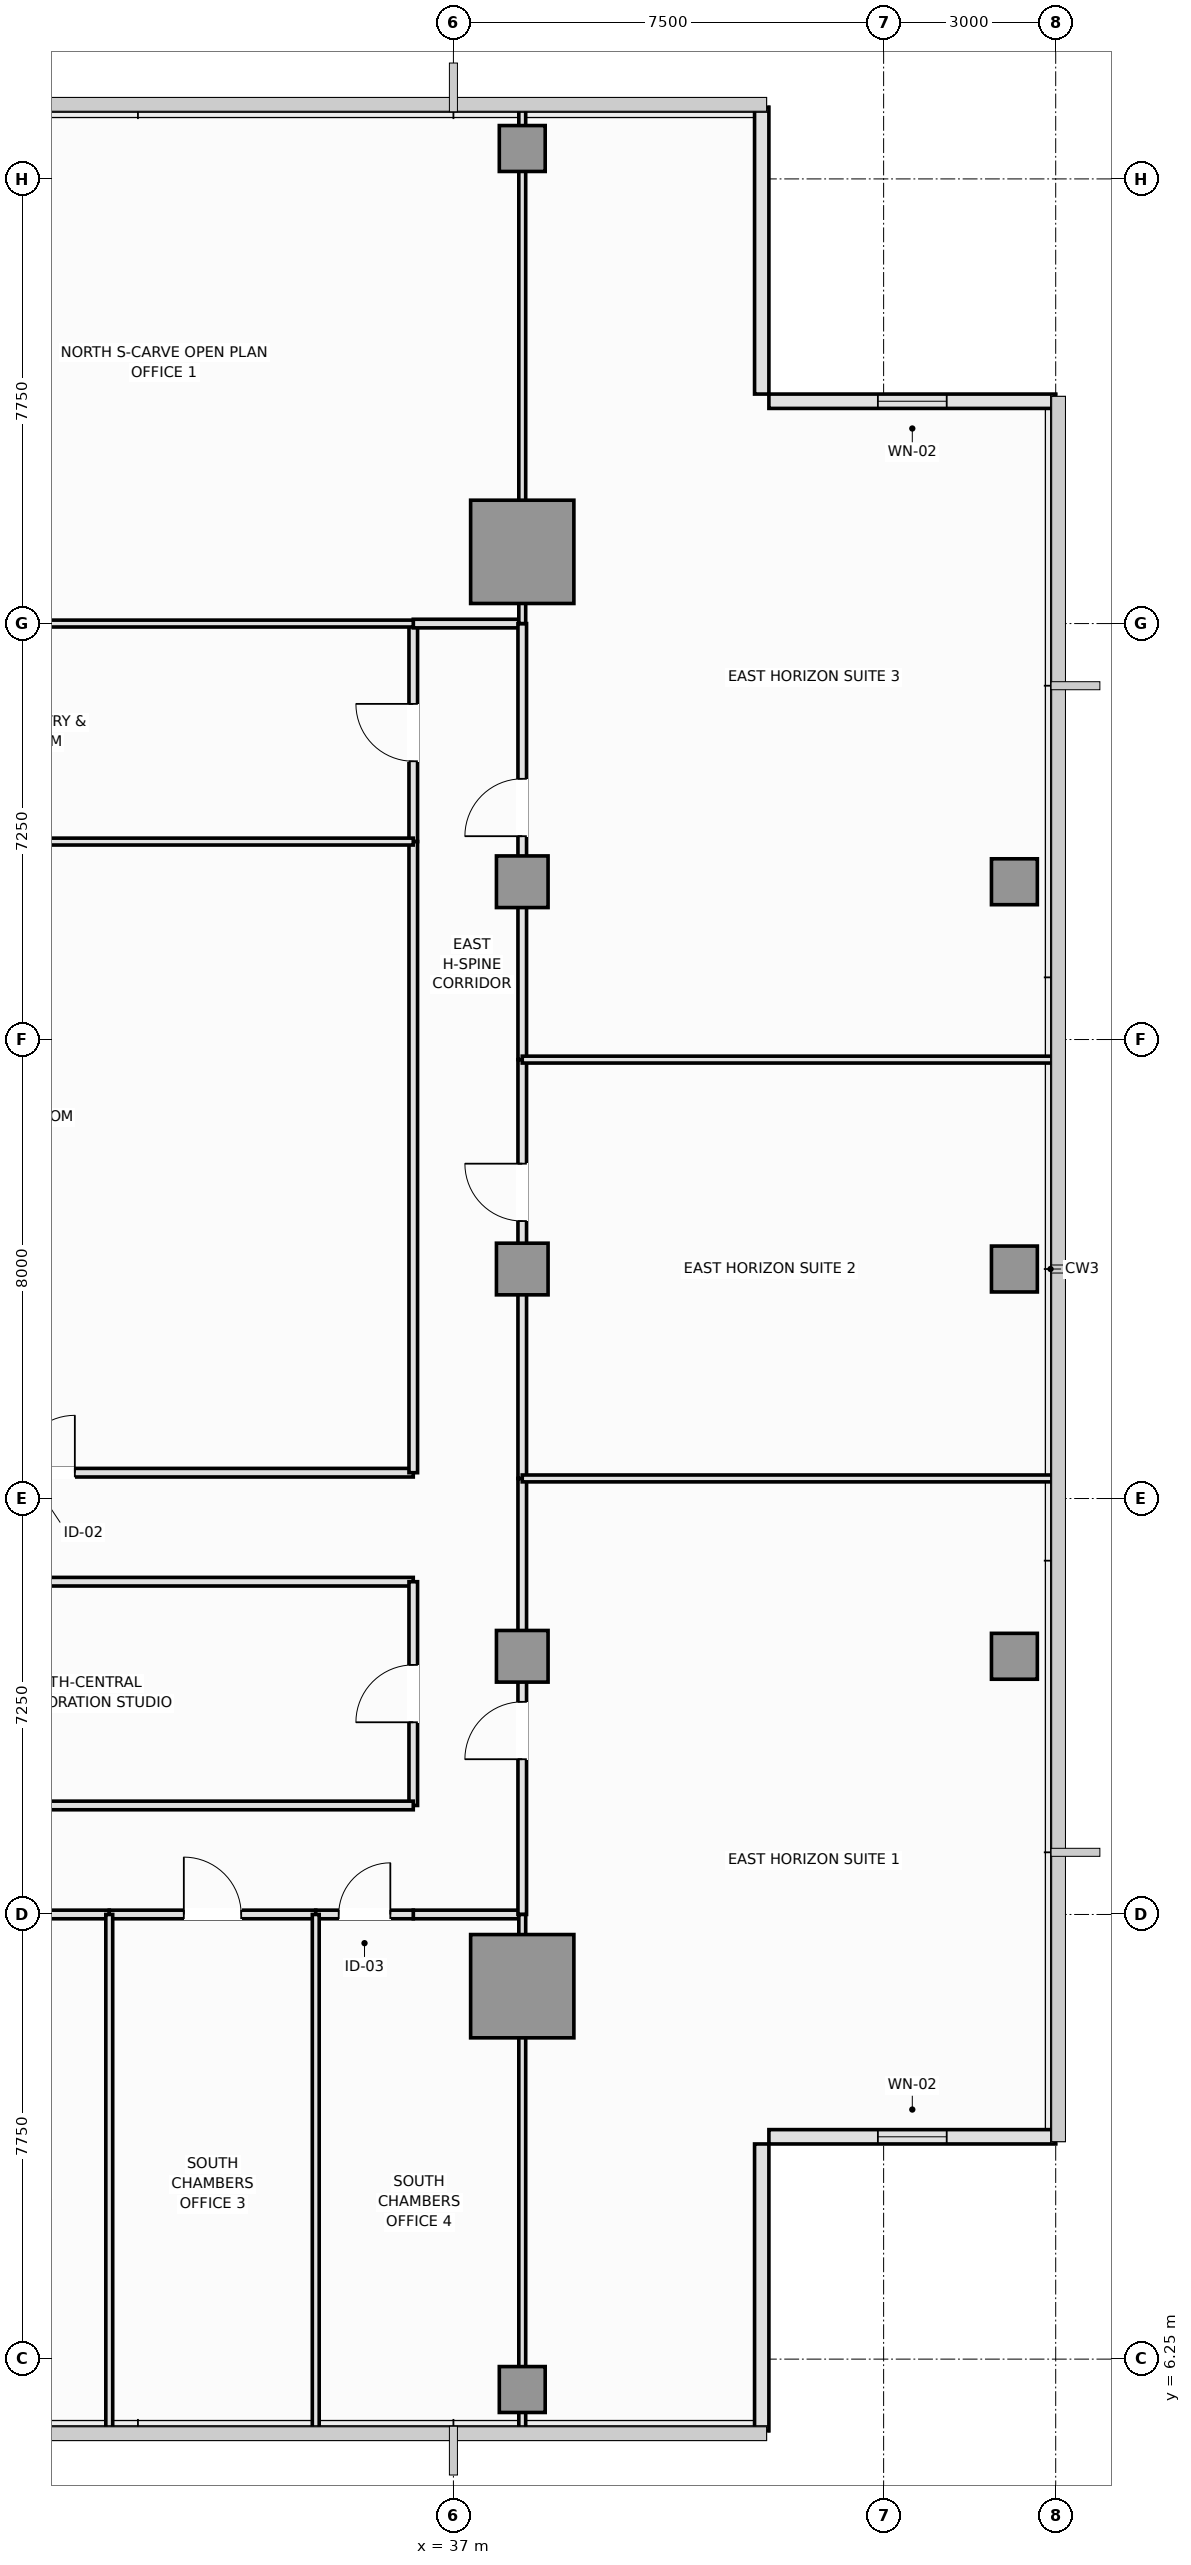
"""IFC4 building model, lengths in metres.
Left out: names, types, materials, properties, quantities, classifications, styles, units other than length and angle.
Written with IfcOpenShell. Run it as: python <this file> out.ifc"""

import sys

from ifc_helpers import new_model, si_unit, direction, frame, frame_2d, origin, origin_2d, place, context, subcontext, project, spatial, rectangle, extrude, element, fill, save


model = new_model("IFC4")
c1 = context("Model", 3, precision=1e-05, world=origin(), true_north=direction((0.0, 1.0)))
c2 = subcontext(c1, "Body", "Model", "MODEL_VIEW")
j1 = project(units=[si_unit("LENGTHUNIT", "METRE"), si_unit("PLANEANGLEUNIT", "RADIAN")], contexts=[c1])
p1 = place(None, origin())
s1 = spatial("IfcSite", under=j1, at=p1, CompositionType="ELEMENT")
p2 = place(p1, origin())
s2 = spatial("IfcBuilding", under=s1, at=p2, CompositionType="ELEMENT")
p3 = place(p2, frame((0.0, 0.0, 223.55)))
s3 = spatial("IfcBuildingStorey", under=s2, at=p3, CompositionType="ELEMENT", Elevation=223.55)
for number, where, z_axis, x_axis in (
    (1, (38.2, 12.75, 0.0), (0.0, 0.0, 1.0), (1.0, 0.0, 0.0)),
    (2, (38.2, 37.75, 0.0), (0.0, 0.0, 1.0), (1.0, 0.0, 0.0)),
):
    element("IfcColumn", number, at=place(p3, frame(where, z_axis=z_axis, x_axis=x_axis)), inside=s3, PredefinedType="COLUMN", context=c2, shape_type="SweptSolid", body=[
        extrude(rectangle(XDim=1.8, YDim=1.8, at=origin_2d()), origin(), (0.0, 0.0, 1.0), 3.55),
    ])
for number, where, z_axis, x_axis in (
    (3, (38.2, 18.5, 0.0), (0.0, 0.0, 1.0), (1.0, 0.0, 0.0)),
    (4, (38.2, 25.25, 0.0), (0.0, 0.0, 1.0), (1.0, 0.0, 0.0)),
    (5, (38.2, 32.0, 0.0), (0.0, 0.0, 1.0), (1.0, 0.0, 0.0)),
):
    element("IfcColumn", number, at=place(p3, frame(where, z_axis=z_axis, x_axis=x_axis)), inside=s3, PredefinedType="COLUMN", context=c2, shape_type="SweptSolid", body=[
        extrude(rectangle(XDim=0.9, YDim=0.9, at=origin_2d()), origin(), (0.0, 0.0, 1.0), 3.55),
    ])
for number, where, z_axis, x_axis in (
    (6, (46.78, 18.5, 0.0), (0.0, 0.0, 1.0), (1.0, 0.0, 0.0)),
    (7, (46.78, 25.25, 0.0), (0.0, 0.0, 1.0), (1.0, 0.0, 0.0)),
    (8, (46.78, 32.0, 0.0), (0.0, 0.0, 1.0), (1.0, 0.0, 0.0)),
    (9, (38.2, 5.72, 0.0), (0.0, 0.0, 1.0), (1.0, 0.0, 0.0)),
    (10, (38.2, 44.78, 0.0), (0.0, 0.0, 1.0), (1.0, 0.0, 0.0)),
):
    element("IfcColumn", number, at=place(p3, frame(where, z_axis=z_axis, x_axis=x_axis)), inside=s3, PredefinedType="COLUMN", context=c2, shape_type="SweptSolid", body=[
        extrude(rectangle(XDim=0.8, YDim=0.8, at=origin_2d()), origin(), (0.0, 0.0, 1.0), 3.55),
    ])
p4 = place(p3, frame((42.375, 5.0, 0.0), z_axis=(0.0, 0.0, 1.0), x_axis=(0.0, 1.0, 0.0)))
e11 = element("IfcWall", 11, at=p4, inside=s3, PredefinedType="SOLIDWALL", context=c2, shape_type="SweptSolid", body=[
    extrude(rectangle(XDim=5.0, YDim=0.25, at=frame_2d((2.5, 0.0))), origin(), (0.0, 0.0, 1.0), 3.37),
])
p5 = place(p3, frame((42.5, 10.125, 0.0), z_axis=(0.0, 0.0, 1.0), x_axis=(1.0, 0.0, 0.0)))
e12 = element("IfcWall", 12, at=p5, inside=s3, PredefinedType="SOLIDWALL", context=c2, shape_type="SweptSolid", body=[
    extrude(rectangle(XDim=5.0, YDim=0.25, at=frame_2d((2.5, 0.0))), origin(), (0.0, 0.0, 1.0), 3.37),
])
p6 = place(p5, frame((1.9, 0.0, 0.9)))
e13 = element("IfcOpeningElement", 13, at=p6, cuts=e12, PredefinedType="OPENING", context=c2, shape_type="SweptSolid", body=[
    extrude(rectangle(XDim=1.2, YDim=1.8, at=frame_2d((0.6, 0.9))), frame((0.0, 0.135, 0.0), z_axis=(0.0, -1.0, 0.0), x_axis=(1.0, 0.0, 0.0)), (0.0, 0.0, 1.0), 0.27),
])
p7 = place(p3, frame((47.5, 40.375, 0.0), z_axis=(0.0, 0.0, 1.0), x_axis=(-1.0, 0.0, 0.0)))
e14 = element("IfcWall", 14, at=p7, inside=s3, PredefinedType="SOLIDWALL", context=c2, shape_type="SweptSolid", body=[
    extrude(rectangle(XDim=5.0, YDim=0.25, at=frame_2d((2.5, 0.0))), origin(), (0.0, 0.0, 1.0), 3.37),
])
p8 = place(p7, frame((1.9, 0.0, 0.9)))
e15 = element("IfcOpeningElement", 15, at=p8, cuts=e14, PredefinedType="OPENING", context=c2, shape_type="SweptSolid", body=[
    extrude(rectangle(XDim=1.2, YDim=1.8, at=frame_2d((0.6, 0.9))), frame((0.0, 0.135, 0.0), z_axis=(0.0, -1.0, 0.0), x_axis=(1.0, 0.0, 0.0)), (0.0, 0.0, 1.0), 0.27),
])
p9 = place(p3, frame((42.375, 40.5, 0.0), z_axis=(0.0, 0.0, 1.0), x_axis=(0.0, 1.0, 0.0)))
e16 = element("IfcWall", 16, at=p9, inside=s3, PredefinedType="SOLIDWALL", context=c2, shape_type="SweptSolid", body=[
    extrude(rectangle(XDim=5.0, YDim=0.25, at=frame_2d((2.5, 0.0))), origin(), (0.0, 0.0, 1.0), 3.37),
])
p10 = place(p3, frame((26.13, 19.8, 0.0), z_axis=(0.0, 0.0, 1.0), x_axis=(1.0, 0.0, 0.0)))
e17 = element("IfcWall", 17, at=p10, inside=s3, PredefinedType="PARTITIONING", context=c2, shape_type="SweptSolid", body=[
    extrude(rectangle(XDim=10.17, YDim=0.15, at=frame_2d((5.085, 0.0))), origin(), (0.0, 0.0, 1.0), 3.37),
])
p11 = place(p3, frame((23.5, 21.7, 0.0), z_axis=(0.0, 0.0, 1.0), x_axis=(1.0, 0.0, 0.0)))
e18 = element("IfcWall", 18, at=p11, inside=s3, PredefinedType="PARTITIONING", context=c2, shape_type="SweptSolid", body=[
    extrude(rectangle(XDim=12.8, YDim=0.15, at=frame_2d((6.4, 0.0))), origin(), (0.0, 0.0, 1.0), 3.37),
])
p12 = place(p11, frame((5.9, 0.0, 0.0)))
e19 = element("IfcOpeningElement", 19, at=p12, cuts=e18, PredefinedType="OPENING", context=c2, shape_type="SweptSolid", body=[
    extrude(rectangle(XDim=1.0, YDim=2.15, at=frame_2d((0.5, 1.075))), frame((0.0, 0.085, 0.0), z_axis=(0.0, -1.0, 0.0), x_axis=(1.0, 0.0, 0.0)), (0.0, 0.0, 1.0), 0.17),
])
p13 = place(p3, frame((36.3, 15.9, 0.0), z_axis=(0.0, 0.0, 1.0), x_axis=(0.0, 1.0, 0.0)))
e20 = element("IfcWall", 20, at=p13, inside=s3, PredefinedType="PARTITIONING", context=c2, shape_type="SweptSolid", body=[
    extrude(rectangle(XDim=3.9, YDim=0.15, at=frame_2d((1.95, 0.0))), origin(), (0.0, 0.0, 1.0), 3.37),
])
p14 = place(p13, frame((1.45, 0.0, 0.0)))
e21 = element("IfcOpeningElement", 21, at=p14, cuts=e20, PredefinedType="OPENING", context=c2, shape_type="SweptSolid", body=[
    extrude(rectangle(XDim=1.0, YDim=2.15, at=frame_2d((0.5, 1.075))), frame((0.0, 0.085, 0.0), z_axis=(0.0, -1.0, 0.0), x_axis=(1.0, 0.0, 0.0)), (0.0, 0.0, 1.0), 0.17),
])
p15 = place(p3, frame((36.3, 32.7, 0.0), z_axis=(0.0, 0.0, 1.0), x_axis=(0.0, 1.0, 0.0)))
e22 = element("IfcWall", 22, at=p15, inside=s3, PredefinedType="PARTITIONING", context=c2, shape_type="SweptSolid", body=[
    extrude(rectangle(XDim=3.8, YDim=0.15, at=frame_2d((1.9, 0.0))), origin(), (0.0, 0.0, 1.0), 3.37),
])
p16 = place(p15, frame((1.4, 0.0, 0.0)))
e23 = element("IfcOpeningElement", 23, at=p16, cuts=e22, PredefinedType="OPENING", context=c2, shape_type="SweptSolid", body=[
    extrude(rectangle(XDim=1.0, YDim=2.15, at=frame_2d((0.5, 1.075))), frame((0.0, 0.085, 0.0), z_axis=(0.0, -1.0, 0.0), x_axis=(1.0, 0.0, 0.0)), (0.0, 0.0, 1.0), 0.17),
])
p17 = place(p3, frame((36.3, 21.7, 0.0), z_axis=(0.0, 0.0, 1.0), x_axis=(0.0, 1.0, 0.0)))
e24 = element("IfcWall", 24, at=p17, inside=s3, PredefinedType="PARTITIONING", context=c2, shape_type="SweptSolid", body=[
    extrude(rectangle(XDim=11.0, YDim=0.15, at=frame_2d((5.5, 0.0))), origin(), (0.0, 0.0, 1.0), 3.37),
])
for number, where, z_axis, x_axis in (
    (25, (36.3, 14.0, 0.0), (0.0, 0.0, 1.0), (1.0, 0.0, 0.0)),
    (26, (36.3, 36.5, 0.0), (0.0, 0.0, 1.0), (1.0, 0.0, 0.0)),
):
    element("IfcWall", number, at=place(p3, frame(where, z_axis=z_axis, x_axis=x_axis)), inside=s3, PredefinedType="PARTITIONING", context=c2, shape_type="SweptSolid", body=[
        extrude(rectangle(XDim=1.9, YDim=0.15, at=frame_2d((0.95, 0.0))), origin(), (0.0, 0.0, 1.0), 3.37),
    ])
p18 = place(p3, frame((38.2, 14.0, 0.0), z_axis=(0.0, 0.0, 1.0), x_axis=(0.0, 1.0, 0.0)))
e27 = element("IfcWall", 27, at=p18, inside=s3, PredefinedType="PARTITIONING", context=c2, shape_type="SweptSolid", body=[
    extrude(rectangle(XDim=7.6, YDim=0.15, at=frame_2d((3.8, 0.0))), origin(), (0.0, 0.0, 1.0), 2.92),
])
p19 = place(p18, frame((2.706, 0.0, 0.0)))
e28 = element("IfcOpeningElement", 28, at=p19, cuts=e27, PredefinedType="OPENING", context=c2, shape_type="SweptSolid", body=[
    extrude(rectangle(XDim=1.0, YDim=2.15, at=frame_2d((0.5, 1.075))), frame((0.0, 0.085, 0.0), z_axis=(0.0, -1.0, 0.0), x_axis=(1.0, 0.0, 0.0)), (0.0, 0.0, 1.0), 0.17),
])
p20 = place(p3, frame((38.2, 21.6, 0.0), z_axis=(0.0, 0.0, 1.0), x_axis=(0.0, 1.0, 0.0)))
e29 = element("IfcWall", 29, at=p20, inside=s3, PredefinedType="PARTITIONING", context=c2, shape_type="SweptSolid", body=[
    extrude(rectangle(XDim=7.3, YDim=0.15, at=frame_2d((3.65, 0.0))), origin(), (0.0, 0.0, 1.0), 2.92),
])
p21 = place(p20, frame((4.486, 0.0, 0.0)))
e30 = element("IfcOpeningElement", 30, at=p21, cuts=e29, PredefinedType="OPENING", context=c2, shape_type="SweptSolid", body=[
    extrude(rectangle(XDim=1.0, YDim=2.15, at=frame_2d((0.5, 1.075))), frame((0.0, 0.085, 0.0), z_axis=(0.0, -1.0, 0.0), x_axis=(1.0, 0.0, 0.0)), (0.0, 0.0, 1.0), 0.17),
])
p22 = place(p3, frame((38.2, 28.9, 0.0), z_axis=(0.0, 0.0, 1.0), x_axis=(0.0, 1.0, 0.0)))
e31 = element("IfcWall", 31, at=p22, inside=s3, PredefinedType="PARTITIONING", context=c2, shape_type="SweptSolid", body=[
    extrude(rectangle(XDim=7.6, YDim=0.15, at=frame_2d((3.8, 0.0))), origin(), (0.0, 0.0, 1.0), 2.92),
])
p23 = place(p22, frame((3.894, 0.0, 0.0)))
e32 = element("IfcOpeningElement", 32, at=p23, cuts=e31, PredefinedType="OPENING", context=c2, shape_type="SweptSolid", body=[
    extrude(rectangle(XDim=1.0, YDim=2.15, at=frame_2d((0.5, 1.075))), frame((0.0, 0.085, 0.0), z_axis=(0.0, -1.0, 0.0), x_axis=(1.0, 0.0, 0.0)), (0.0, 0.0, 1.0), 0.17),
])
p24 = place(p3, frame((26.13, 15.9, 0.0), z_axis=(0.0, 0.0, 1.0), x_axis=(1.0, 0.0, 0.0)))
e33 = element("IfcWall", 33, at=p24, inside=s3, PredefinedType="PARTITIONING", context=c2, shape_type="SweptSolid", body=[
    extrude(rectangle(XDim=10.17, YDim=0.15, at=frame_2d((5.085, 0.0))), origin(), (0.0, 0.0, 1.0), 3.37),
])
p25 = place(p3, frame((27.5, 14.0, 0.0), z_axis=(0.0, 0.0, 1.0), x_axis=(1.0, 0.0, 0.0)))
e34 = element("IfcWall", 34, at=p25, inside=s3, PredefinedType="PARTITIONING", context=c2, shape_type="SweptSolid", body=[
    extrude(rectangle(XDim=3.5, YDim=0.15, at=frame_2d((1.75, 0.0))), origin(), (0.0, 0.0, 1.0), 3.37),
])
p26 = place(p25, frame((1.25, 0.0, 0.0)))
e35 = element("IfcOpeningElement", 35, at=p26, cuts=e34, PredefinedType="OPENING", context=c2, shape_type="SweptSolid", body=[
    extrude(rectangle(XDim=1.0, YDim=2.15, at=frame_2d((0.5, 1.075))), frame((0.0, 0.085, 0.0), z_axis=(0.0, -1.0, 0.0), x_axis=(1.0, 0.0, 0.0)), (0.0, 0.0, 1.0), 0.17),
])
p27 = place(p3, frame((31.0, 14.0, 0.0), z_axis=(0.0, 0.0, 1.0), x_axis=(1.0, 0.0, 0.0)))
e36 = element("IfcWall", 36, at=p27, inside=s3, PredefinedType="PARTITIONING", context=c2, shape_type="SweptSolid", body=[
    extrude(rectangle(XDim=3.6, YDim=0.15, at=frame_2d((1.8, 0.0))), origin(), (0.0, 0.0, 1.0), 3.37),
])
p28 = place(p27, frame((1.3, 0.0, 0.0)))
e37 = element("IfcOpeningElement", 37, at=p28, cuts=e36, PredefinedType="OPENING", context=c2, shape_type="SweptSolid", body=[
    extrude(rectangle(XDim=1.0, YDim=2.15, at=frame_2d((0.5, 1.075))), frame((0.0, 0.085, 0.0), z_axis=(0.0, -1.0, 0.0), x_axis=(1.0, 0.0, 0.0)), (0.0, 0.0, 1.0), 0.17),
])
p29 = place(p3, frame((34.6, 14.0, 0.0), z_axis=(0.0, 0.0, 1.0), x_axis=(1.0, 0.0, 0.0)))
e38 = element("IfcWall", 38, at=p29, inside=s3, PredefinedType="PARTITIONING", context=c2, shape_type="SweptSolid", body=[
    extrude(rectangle(XDim=1.7, YDim=0.15, at=frame_2d((0.85, 0.0))), origin(), (0.0, 0.0, 1.0), 3.37),
])
p30 = place(p29, frame((0.4, 0.0, 0.0)))
e39 = element("IfcOpeningElement", 39, at=p30, cuts=e38, PredefinedType="OPENING", context=c2, shape_type="SweptSolid", body=[
    extrude(rectangle(XDim=0.9, YDim=2.1, at=frame_2d((0.45, 1.05))), frame((0.0, 0.085, 0.0), z_axis=(0.0, -1.0, 0.0), x_axis=(1.0, 0.0, 0.0)), (0.0, 0.0, 1.0), 0.17),
])
for number, where, z_axis, x_axis in (
    (40, (23.5, 32.7, 0.0), (0.0, 0.0, 1.0), (1.0, 0.0, 0.0)),
    (41, (23.5, 36.5, 0.0), (0.0, 0.0, 1.0), (1.0, 0.0, 0.0)),
):
    element("IfcWall", number, at=place(p3, frame(where, z_axis=z_axis, x_axis=x_axis)), inside=s3, PredefinedType="PARTITIONING", context=c2, shape_type="SweptSolid", body=[
        extrude(rectangle(XDim=12.8, YDim=0.12, at=frame_2d((6.4, 0.0))), origin(), (0.0, 0.0, 1.0), 3.37),
    ])
for number, where, z_axis, x_axis in (
    (42, (31.0, 5.01, 0.0), (0.0, 0.0, 1.0), (0.0, 1.0, 0.0)),
    (43, (34.6, 5.01, 0.0), (0.0, 0.0, 1.0), (0.0, 1.0, 0.0)),
):
    element("IfcWall", number, at=place(p3, frame(where, z_axis=z_axis, x_axis=x_axis)), inside=s3, PredefinedType="PARTITIONING", context=c2, shape_type="SweptSolid", body=[
        extrude(rectangle(XDim=8.99, YDim=0.12, at=frame_2d((4.495, 0.0))), origin(), (0.0, 0.0, 1.0), 3.37),
    ])
for number, where, z_axis, x_axis in (
    (44, (38.2, 5.01, 0.0), (0.0, 0.0, 1.0), (0.0, 1.0, 0.0)),
    (45, (38.2, 36.5, 0.0), (0.0, 0.0, 1.0), (0.0, 1.0, 0.0)),
):
    element("IfcWall", number, at=place(p3, frame(where, z_axis=z_axis, x_axis=x_axis)), inside=s3, PredefinedType="PARTITIONING", context=c2, shape_type="SweptSolid", body=[
        extrude(rectangle(XDim=8.99, YDim=0.12, at=frame_2d((4.495, 0.0))), origin(), (0.0, 0.0, 1.0), 2.92),
    ])
for number, where, z_axis, x_axis in (
    (46, (38.2, 21.6, 0.0), (0.0, 0.0, 1.0), (1.0, 0.0, 0.0)),
    (47, (38.2, 28.9, 0.0), (0.0, 0.0, 1.0), (1.0, 0.0, 0.0)),
):
    element("IfcWall", number, at=place(p3, frame(where, z_axis=z_axis, x_axis=x_axis)), inside=s3, PredefinedType="PARTITIONING", context=c2, shape_type="SweptSolid", body=[
        extrude(rectangle(XDim=9.29, YDim=0.12, at=frame_2d((4.645, 0.0))), origin(), (0.0, 0.0, 1.0), 3.37),
    ])
p31 = place(p6, origin())
e48 = element("IfcWindow", 48, at=p31, inside=s3, PartitioningType="SINGLE_PANEL", PredefinedType="WINDOW", context=c2, shape_type="SweptSolid", body=[
    extrude(rectangle(XDim=1.2, YDim=1.8, at=frame_2d((0.6, 0.9))), frame((0.0, 0.03, 0.0), z_axis=(0.0, -1.0, 0.0), x_axis=(1.0, 0.0, 0.0)), (0.0, 0.0, 1.0), 0.06),
])
fill(e13, e48)
p32 = place(p8, origin())
e49 = element("IfcWindow", 49, at=p32, inside=s3, PartitioningType="SINGLE_PANEL", PredefinedType="WINDOW", context=c2, shape_type="SweptSolid", body=[
    extrude(rectangle(XDim=1.2, YDim=1.8, at=frame_2d((0.6, 0.9))), frame((0.0, 0.03, 0.0), z_axis=(0.0, -1.0, 0.0), x_axis=(1.0, 0.0, 0.0)), (0.0, 0.0, 1.0), 0.06),
])
fill(e15, e49)
p33 = place(p12, origin())
e50 = element("IfcDoor", 50, at=p33, inside=s3, OperationType="SINGLE_SWING_RIGHT", PredefinedType="DOOR", context=c2, shape_type="SweptSolid", body=[
    extrude(rectangle(XDim=1.0, YDim=2.15, at=frame_2d((0.5, 1.075))), frame((0.0, 0.025, 0.0), z_axis=(0.0, -1.0, 0.0), x_axis=(1.0, 0.0, 0.0)), (0.0, 0.0, 1.0), 0.05),
])
fill(e19, e50)
p34 = place(p14, origin())
e51 = element("IfcDoor", 51, at=p34, inside=s3, OperationType="SINGLE_SWING_LEFT", PredefinedType="DOOR", context=c2, shape_type="SweptSolid", body=[
    extrude(rectangle(XDim=1.0, YDim=2.15, at=frame_2d((0.5, 1.075))), frame((0.0, 0.025, 0.0), z_axis=(0.0, -1.0, 0.0), x_axis=(1.0, 0.0, 0.0)), (0.0, 0.0, 1.0), 0.05),
])
fill(e21, e51)
p35 = place(p16, origin())
e52 = element("IfcDoor", 52, at=p35, inside=s3, OperationType="SINGLE_SWING_RIGHT", PredefinedType="DOOR", context=c2, shape_type="SweptSolid", body=[
    extrude(rectangle(XDim=1.0, YDim=2.15, at=frame_2d((0.5, 1.075))), frame((0.0, 0.025, 0.0), z_axis=(0.0, -1.0, 0.0), x_axis=(1.0, 0.0, 0.0)), (0.0, 0.0, 1.0), 0.05),
])
fill(e23, e52)
p36 = place(p19, origin())
e53 = element("IfcDoor", 53, at=p36, inside=s3, OperationType="SINGLE_SWING_LEFT", PredefinedType="DOOR", context=c2, shape_type="SweptSolid", body=[
    extrude(rectangle(XDim=1.0, YDim=2.15, at=frame_2d((0.5, 1.075))), frame((0.0, 0.025, 0.0), z_axis=(0.0, -1.0, 0.0), x_axis=(1.0, 0.0, 0.0)), (0.0, 0.0, 1.0), 0.05),
])
fill(e28, e53)
p37 = place(p21, origin())
e54 = element("IfcDoor", 54, at=p37, inside=s3, OperationType="SINGLE_SWING_RIGHT", PredefinedType="DOOR", context=c2, shape_type="SweptSolid", body=[
    extrude(rectangle(XDim=1.0, YDim=2.15, at=frame_2d((0.5, 1.075))), frame((0.0, 0.025, 0.0), z_axis=(0.0, -1.0, 0.0), x_axis=(1.0, 0.0, 0.0)), (0.0, 0.0, 1.0), 0.05),
])
fill(e30, e54)
p38 = place(p23, origin())
e55 = element("IfcDoor", 55, at=p38, inside=s3, OperationType="SINGLE_SWING_LEFT", PredefinedType="DOOR", context=c2, shape_type="SweptSolid", body=[
    extrude(rectangle(XDim=1.0, YDim=2.15, at=frame_2d((0.5, 1.075))), frame((0.0, 0.025, 0.0), z_axis=(0.0, -1.0, 0.0), x_axis=(1.0, 0.0, 0.0)), (0.0, 0.0, 1.0), 0.05),
])
fill(e32, e55)
p39 = place(p28, origin())
e56 = element("IfcDoor", 56, at=p39, inside=s3, OperationType="SINGLE_SWING_LEFT", PredefinedType="DOOR", context=c2, shape_type="SweptSolid", body=[
    extrude(rectangle(XDim=1.0, YDim=2.15, at=frame_2d((0.5, 1.075))), frame((0.0, 0.025, 0.0), z_axis=(0.0, -1.0, 0.0), x_axis=(1.0, 0.0, 0.0)), (0.0, 0.0, 1.0), 0.05),
])
fill(e37, e56)
p40 = place(p30, origin())
e57 = element("IfcDoor", 57, at=p40, inside=s3, OperationType="SINGLE_SWING_RIGHT", PredefinedType="DOOR", context=c2, shape_type="SweptSolid", body=[
    extrude(rectangle(XDim=0.9, YDim=2.1, at=frame_2d((0.45, 1.05))), frame((0.0, 0.025, 0.0), z_axis=(0.0, -1.0, 0.0), x_axis=(1.0, 0.0, 0.0)), (0.0, 0.0, 1.0), 0.05),
])
fill(e39, e57)
save(model, sys.argv[1])
